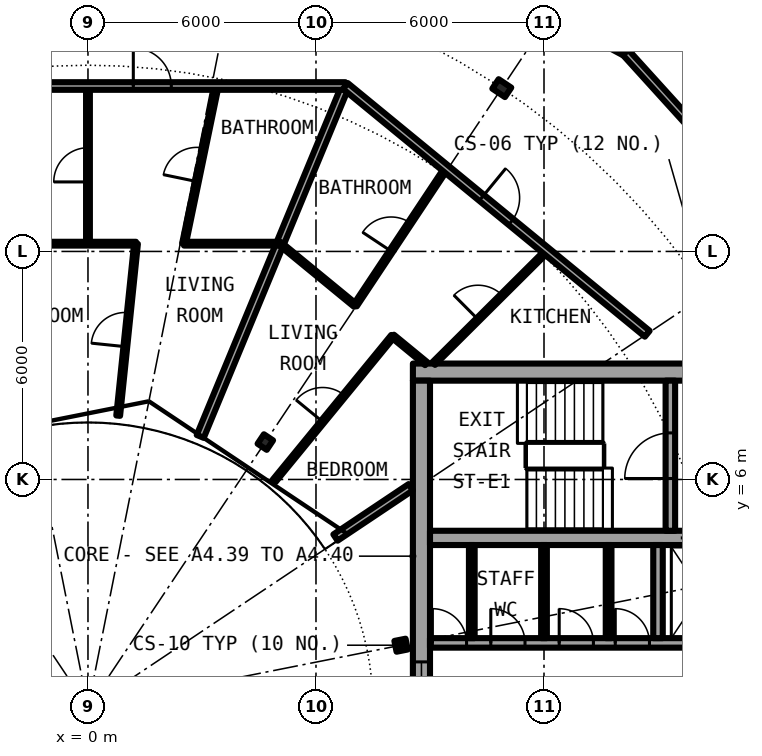
"""IFC4 building model, lengths in metres.
Left out: names, types, materials, properties, quantities, classifications, styles, units other than length and angle.
Written with IfcOpenShell. Run it as: python <this file> out.ifc"""

import sys

from ifc_helpers import new_model, si_unit, direction, frame, frame_2d, origin, origin_2d, place, context, subcontext, project, spatial, rectangle, i_section, extrude, element, fill, save


model = new_model("IFC4")
c1 = context("Model", 3, precision=1e-05, world=origin(), true_north=direction((0.0, 1.0)))
c2 = subcontext(c1, "Body", "Model", "MODEL_VIEW")
j1 = project(units=[si_unit("LENGTHUNIT", "METRE"), si_unit("PLANEANGLEUNIT", "RADIAN")], contexts=[c1])
p1 = place(None, origin())
s1 = spatial("IfcSite", under=j1, at=p1, CompositionType="ELEMENT")
p2 = place(p1, origin())
s2 = spatial("IfcBuilding", under=s1, at=p2, CompositionType="ELEMENT")
p3 = place(p2, frame((0.0, 0.0, 212.7)))
s3 = spatial("IfcBuildingStorey", under=s2, at=p3, CompositionType="ELEMENT", Elevation=212.7)
p4 = place(p3, frame((10.889, 16.297, 0.0), z_axis=(0.0, 0.0, 1.0), x_axis=(0.55557023302, 0.831469612303, 0.0)))
e1 = element("IfcColumn", 1, at=p4, inside=s3, PredefinedType="COLUMN", context=c2, shape_type="SweptSolid", body=[
    extrude(i_section(OverallWidth=0.3, OverallDepth=0.4, WebThickness=0.013, FlangeThickness=0.024, FilletRadius=0.027, at=origin_2d()), origin(), (0.0, 0.0, 1.0), 3.05),
])
for number, where, z_axis, x_axis in (
    (2, (8.239, 1.639, 0.0), (0.0, 0.0, 1.0), (0.981, 0.195, 0.0)),
    (3, (4.667, 6.984, 0.0), (0.0, 0.0, 1.0), (0.556, 0.831, 0.0)),
):
    element("IfcColumn", number, at=place(p3, frame(where, z_axis=z_axis, x_axis=x_axis)), inside=s3, PredefinedType="COLUMN", context=c2, shape_type="SweptSolid", body=[
        extrude(i_section(OverallWidth=0.3, OverallDepth=0.29, WebThickness=0.009, FlangeThickness=0.014, FilletRadius=0.027, at=origin_2d()), origin(), (0.0, 0.0, 1.0), 3.05),
    ])
p5 = place(p3, frame((22.05, 8.825, 0.0), z_axis=(0.0, 0.0, 1.0), x_axis=(-1.0, 0.0, 0.0)))
e4 = element("IfcWall", 4, at=p5, inside=s3, PredefinedType="SHEAR", context=c2, shape_type="SweptSolid", body=[
    extrude(rectangle(XDim=13.5, YDim=0.45, at=frame_2d((6.75, 0.0))), origin(), (0.0, 0.0, 1.0), 3.05),
])
p6 = place(p5, frame((0.975, 0.0, 0.0)))
e5 = element("IfcOpeningElement", 5, at=p6, cuts=e4, PredefinedType="OPENING", context=c2, shape_type="SweptSolid", body=[
    extrude(rectangle(XDim=1.2, YDim=2.3, at=frame_2d((0.6, 1.15))), frame((0.0, 0.235, 0.0), z_axis=(0.0, -1.0, 0.0), x_axis=(1.0, 0.0, 0.0)), (0.0, 0.0, 1.0), 0.47),
])
p7 = place(p3, frame((8.775, -8.6, 0.0), z_axis=(0.0, 0.0, 1.0), x_axis=(0.0, 1.0, 0.0)))
e6 = element("IfcWall", 6, at=p7, inside=s3, PredefinedType="SHEAR", context=c2, shape_type="SweptSolid", body=[
    extrude(rectangle(XDim=17.2, YDim=0.45, at=frame_2d((8.6, 0.0))), origin(), (0.0, 0.0, 1.0), 3.05),
])
p8 = place(p7, frame((7.4, 0.0, 0.1)))
e7 = element("IfcOpeningElement", 7, at=p8, cuts=e6, PredefinedType="OPENING", context=c2, shape_type="SweptSolid", body=[
    extrude(rectangle(XDim=2.4, YDim=2.2, at=frame_2d((1.2, 1.1))), frame((0.0, 0.235, 0.0), z_axis=(0.0, -1.0, 0.0), x_axis=(1.0, 0.0, 0.0)), (0.0, 0.0, 1.0), 0.47),
])
p9 = place(p3, frame((9.0, 1.7, 0.0), z_axis=(0.0, 0.0, 1.0), x_axis=(1.0, 0.0, 0.0)))
e8 = element("IfcWall", 8, at=p9, inside=s3, PredefinedType="SHEAR", context=c2, shape_type="SweptSolid", body=[
    extrude(rectangle(XDim=10.15, YDim=0.25, at=frame_2d((5.075, 0.0))), origin(), (0.0, 0.0, 1.0), 3.05),
])
p10 = place(p9, frame((0.062, 0.0, 0.0)))
e9 = element("IfcOpeningElement", 9, at=p10, cuts=e8, PredefinedType="OPENING", context=c2, shape_type="SweptSolid", body=[
    extrude(rectangle(XDim=0.9, YDim=2.3, at=frame_2d((0.45, 1.15))), frame((0.0, 0.135, 0.0), z_axis=(0.0, -1.0, 0.0), x_axis=(1.0, 0.0, 0.0)), (0.0, 0.0, 1.0), 0.27),
])
p11 = place(p9, frame((1.6, 0.0, 0.0)))
e10 = element("IfcOpeningElement", 10, at=p11, cuts=e8, PredefinedType="OPENING", context=c2, shape_type="SweptSolid", body=[
    extrude(rectangle(XDim=0.9, YDim=2.3, at=frame_2d((0.45, 1.15))), frame((0.0, 0.135, 0.0), z_axis=(0.0, -1.0, 0.0), x_axis=(1.0, 0.0, 0.0)), (0.0, 0.0, 1.0), 0.27),
])
p12 = place(p9, frame((3.4, 0.0, 0.0)))
e11 = element("IfcOpeningElement", 11, at=p12, cuts=e8, PredefinedType="OPENING", context=c2, shape_type="SweptSolid", body=[
    extrude(rectangle(XDim=0.9, YDim=2.3, at=frame_2d((0.45, 1.15))), frame((0.0, 0.135, 0.0), z_axis=(0.0, -1.0, 0.0), x_axis=(1.0, 0.0, 0.0)), (0.0, 0.0, 1.0), 0.27),
])
p13 = place(p9, frame((4.875, 0.0, 0.0)))
e12 = element("IfcOpeningElement", 12, at=p13, cuts=e8, PredefinedType="OPENING", context=c2, shape_type="SweptSolid", body=[
    extrude(rectangle(XDim=0.9, YDim=2.3, at=frame_2d((0.45, 1.15))), frame((0.0, 0.135, 0.0), z_axis=(0.0, -1.0, 0.0), x_axis=(1.0, 0.0, 0.0)), (0.0, 0.0, 1.0), 0.27),
])
p14 = place(p9, frame((8.837, 0.0, 0.0)))
e13 = element("IfcOpeningElement", 13, at=p14, cuts=e8, PredefinedType="OPENING", context=c2, shape_type="SweptSolid", body=[
    extrude(rectangle(XDim=0.9, YDim=2.3, at=frame_2d((0.45, 1.15))), frame((0.0, 0.135, 0.0), z_axis=(0.0, -1.0, 0.0), x_axis=(1.0, 0.0, 0.0)), (0.0, 0.0, 1.0), 0.27),
])
p15 = place(p3, frame((9.0, 4.462, 0.0), z_axis=(0.0, 0.0, 1.0), x_axis=(1.0, 0.0, 0.0)))
e14 = element("IfcWall", 14, at=p15, inside=s3, PredefinedType="SHEAR", context=c2, shape_type="SweptSolid", body=[
    extrude(rectangle(XDim=10.15, YDim=0.375, at=frame_2d((5.075, 0.0))), origin(), (0.0, 0.0, 1.0), 3.05),
])
p16 = place(p15, frame((6.6, 0.0, 0.0)))
e15 = element("IfcOpeningElement", 15, at=p16, cuts=e14, PredefinedType="OPENING", context=c2, shape_type="SweptSolid", body=[
    extrude(rectangle(XDim=1.1, YDim=2.3, at=frame_2d((0.55, 1.15))), frame((0.0, 0.198, 0.0), z_axis=(0.0, -1.0, 0.0), x_axis=(1.0, 0.0, 0.0)), (0.0, 0.0, 1.0), 0.395),
])
p17 = place(p3, frame((15.325, 4.65, 0.0), z_axis=(0.0, 0.0, 1.0), x_axis=(0.0, 1.0, 0.0)))
e16 = element("IfcWall", 16, at=p17, inside=s3, PredefinedType="SHEAR", context=c2, shape_type="SweptSolid", body=[
    extrude(rectangle(XDim=3.95, YDim=0.25, at=frame_2d((1.975, 0.0))), origin(), (0.0, 0.0, 1.0), 3.05),
])
p18 = place(p17, frame((1.375, 0.0, 0.0)))
e17 = element("IfcOpeningElement", 17, at=p18, cuts=e16, PredefinedType="OPENING", context=c2, shape_type="SweptSolid", body=[
    extrude(rectangle(XDim=1.2, YDim=2.3, at=frame_2d((0.6, 1.15))), frame((0.0, 0.135, 0.0), z_axis=(0.0, -1.0, 0.0), x_axis=(1.0, 0.0, 0.0)), (0.0, 0.0, 1.0), 0.27),
])
p19 = place(p3, frame((15.0, 1.825, 0.0), z_axis=(0.0, 0.0, 1.0), x_axis=(0.0, 1.0, 0.0)))
e18 = element("IfcWall", 18, at=p19, inside=s3, PredefinedType="SOLIDWALL", context=c2, shape_type="SweptSolid", body=[
    extrude(rectangle(XDim=2.45, YDim=0.25, at=frame_2d((1.225, 0.0))), origin(), (0.0, 0.0, 1.0), 2.7),
])
for number, where, z_axis, x_axis in (
    (19, (10.1, 1.825, 0.0), (0.0, 0.0, 1.0), (0.0, 1.0, 0.0)),
    (20, (12.0, 1.825, 0.0), (0.0, 0.0, 1.0), (0.0, 1.0, 0.0)),
    (21, (13.7, 1.825, 0.0), (0.0, 0.0, 1.0), (0.0, 1.0, 0.0)),
):
    element("IfcWall", number, at=place(p3, frame(where, z_axis=z_axis, x_axis=x_axis)), inside=s3, PredefinedType="PARTITIONING", context=c2, shape_type="SweptSolid", body=[
        extrude(rectangle(XDim=2.45, YDim=0.15, at=frame_2d((1.225, 0.0))), origin(), (0.0, 0.0, 1.0), 2.7),
    ])
p20 = place(p3, frame((4.901, 5.966, 0.0), z_axis=(0.0, 0.0, 1.0), x_axis=(0.633851064378, 0.773455123577, 0.0)))
e22 = element("IfcWall", 22, at=p20, inside=s3, PredefinedType="PARTITIONING", context=c2, shape_type="SweptSolid", body=[
    extrude(rectangle(XDim=4.919, YDim=0.1, at=frame_2d((2.46, 0.0))), origin(), (0.0, 0.0, 1.0), 2.7),
])
p21 = place(p20, frame((2.009, 0.0, 0.0)))
e23 = element("IfcOpeningElement", 23, at=p21, cuts=e22, PredefinedType="OPENING", context=c2, shape_type="SweptSolid", body=[
    extrude(rectangle(XDim=0.9, YDim=2.3, at=frame_2d((0.45, 1.15))), frame((0.0, 0.06, 0.0), z_axis=(0.0, -1.0, 0.0), x_axis=(1.0, 0.0, 0.0)), (0.0, 0.0, 1.0), 0.12),
])
p22 = place(p3, frame((0.0, 12.204, 0.0), z_axis=(0.0, 0.0, 1.0), x_axis=(0.0, 1.0, 0.0)))
e24 = element("IfcWall", 24, at=p22, inside=s3, PredefinedType="PARTITIONING", context=c2, shape_type="SweptSolid", body=[
    extrude(rectangle(XDim=4.149, YDim=0.1, at=frame_2d((2.074, 0.0))), origin(), (0.0, 0.0, 1.0), 2.7),
])
p23 = place(p22, frame((1.625, 0.0, 0.0)))
e25 = element("IfcOpeningElement", 25, at=p23, cuts=e24, PredefinedType="OPENING", context=c2, shape_type="SweptSolid", body=[
    extrude(rectangle(XDim=0.9, YDim=2.3, at=frame_2d((0.45, 1.15))), frame((0.0, 0.06, 0.0), z_axis=(0.0, -1.0, 0.0), x_axis=(1.0, 0.0, 0.0)), (0.0, 0.0, 1.0), 0.12),
])
p24 = place(p3, frame((0.795, 7.679, 0.0), z_axis=(0.0, 0.0, 1.0), x_axis=(0.103089563582, 0.994672077561, 0.0)))
e26 = element("IfcWall", 26, at=p24, inside=s3, PredefinedType="PARTITIONING", context=c2, shape_type="SweptSolid", body=[
    extrude(rectangle(XDim=4.549, YDim=0.1, at=frame_2d((2.275, 0.0))), origin(), (0.0, 0.0, 1.0), 2.7),
])
p25 = place(p24, frame((1.825, 0.0, 0.0)))
e27 = element("IfcOpeningElement", 27, at=p25, cuts=e26, PredefinedType="OPENING", context=c2, shape_type="SweptSolid", body=[
    extrude(rectangle(XDim=0.9, YDim=2.3, at=frame_2d((0.45, 1.15))), frame((0.0, 0.06, 0.0), z_axis=(0.0, -1.0, 0.0), x_axis=(1.0, 0.0, 0.0)), (0.0, 0.0, 1.0), 0.12),
])
p26 = place(p3, frame((2.527, 12.204, 0.0), z_axis=(0.0, 0.0, 1.0), x_axis=(0.202937120105, 0.979191771454, 0.0)))
e28 = element("IfcWall", 28, at=p26, inside=s3, PredefinedType="PARTITIONING", context=c2, shape_type="SweptSolid", body=[
    extrude(rectangle(XDim=4.237, YDim=0.1, at=frame_2d((2.119, 0.0))), origin(), (0.0, 0.0, 1.0), 2.7),
])
p27 = place(p26, frame((1.669, 0.0, 0.0)))
e29 = element("IfcOpeningElement", 29, at=p27, cuts=e28, PredefinedType="OPENING", context=c2, shape_type="SweptSolid", body=[
    extrude(rectangle(XDim=0.9, YDim=2.3, at=frame_2d((0.45, 1.15))), frame((0.0, 0.06, 0.0), z_axis=(0.0, -1.0, 0.0), x_axis=(1.0, 0.0, 0.0)), (0.0, 0.0, 1.0), 0.12),
])
p28 = place(p3, frame((2.954, 7.132, 0.0), z_axis=(0.0, 0.0, 1.0), x_axis=(0.382632652025, 0.923900564782, 0.0)))
e30 = element("IfcWall", 30, at=p28, inside=s3, PredefinedType="PARTITIONING", context=c2, shape_type="SweptSolid", body=[
    extrude(rectangle(XDim=9.98, YDim=0.2, at=frame_2d((4.99, 0.0))), origin(), (0.0, 0.0, 1.0), 2.7),
])
p29 = place(p3, frame((7.031, 10.582, 0.0), z_axis=(0.0, 0.0, 1.0), x_axis=(0.553303732327, 0.832979579457, 0.0)))
e31 = element("IfcWall", 31, at=p29, inside=s3, PredefinedType="PARTITIONING", context=c2, shape_type="SweptSolid", body=[
    extrude(rectangle(XDim=4.319, YDim=0.1, at=frame_2d((2.16, 0.0))), origin(), (0.0, 0.0, 1.0), 2.7),
])
p30 = place(p29, frame((1.71, 0.0, 0.0)))
e32 = element("IfcOpeningElement", 32, at=p30, cuts=e31, PredefinedType="OPENING", context=c2, shape_type="SweptSolid", body=[
    extrude(rectangle(XDim=0.9, YDim=2.3, at=frame_2d((0.45, 1.15))), frame((0.0, 0.06, 0.0), z_axis=(0.0, -1.0, 0.0), x_axis=(1.0, 0.0, 0.0)), (0.0, 0.0, 1.0), 0.12),
])
p31 = place(p3, frame((9.097, 9.05, 0.0), z_axis=(0.0, 0.0, 1.0), x_axis=(0.708909651863, 0.705299302067, 0.0)))
e33 = element("IfcWall", 33, at=p31, inside=s3, PredefinedType="PARTITIONING", context=c2, shape_type="SweptSolid", body=[
    extrude(rectangle(XDim=4.193, YDim=0.1, at=frame_2d((2.096, 0.0))), origin(), (0.0, 0.0, 1.0), 2.7),
])
p32 = place(p31, frame((1.646, 0.0, 0.0)))
e34 = element("IfcOpeningElement", 34, at=p32, cuts=e33, PredefinedType="OPENING", context=c2, shape_type="SweptSolid", body=[
    extrude(rectangle(XDim=0.9, YDim=2.3, at=frame_2d((0.45, 1.15))), frame((0.0, 0.06, 0.0), z_axis=(0.0, -1.0, 0.0), x_axis=(1.0, 0.0, 0.0)), (0.0, 0.0, 1.0), 0.12),
])
p33 = place(p3, frame((14.147, 17.238, 0.0), z_axis=(0.0, 0.0, 1.0), x_axis=(0.634374159378, 0.773026148273, 0.0)))
e35 = element("IfcWall", 35, at=p33, inside=s3, PredefinedType="PARTITIONING", context=c2, shape_type="SweptSolid", body=[
    extrude(rectangle(XDim=4.876, YDim=0.2, at=frame_2d((2.438, 0.0))), origin(), (0.0, 0.0, 1.0), 2.7),
])
p34 = place(p3, frame((15.612, 15.622, 0.0), z_axis=(0.0, 0.0, 1.0), x_axis=(0.70679853939, 0.707414888673, 0.0)))
e36 = element("IfcWall", 36, at=p34, inside=s3, PredefinedType="PARTITIONING", context=c2, shape_type="SweptSolid", body=[
    extrude(rectangle(XDim=1.584, YDim=0.1, at=frame_2d((0.792, 0.0))), origin(), (0.0, 0.0, 1.0), 2.7),
])
p35 = place(p3, frame((6.513, 4.472, 0.0), z_axis=(0.0, 0.0, 1.0), x_axis=(0.831403409976, 0.555669299026, 0.0)))
e37 = element("IfcWall", 37, at=p35, inside=s3, PredefinedType="PARTITIONING", context=c2, shape_type="SweptSolid", body=[
    extrude(rectangle(XDim=2.383, YDim=0.2, at=frame_2d((1.191, 0.0))), origin(), (0.0, 0.0, 1.0), 2.7),
])
p36 = place(p3, frame((-5.055, 12.204, 0.0), z_axis=(0.0, 0.0, 1.0), x_axis=(1.0, 0.0, 0.0)))
e38 = element("IfcWall", 38, at=p36, inside=s3, PredefinedType="PARTITIONING", context=c2, shape_type="SweptSolid", body=[
    extrude(rectangle(XDim=6.319, YDim=0.1, at=frame_2d((3.159, 0.0))), origin(), (0.0, 0.0, 1.0), 2.7),
])
p37 = place(p3, frame((2.527, 12.204, 0.0), z_axis=(0.0, 0.0, 1.0), x_axis=(1.0, 0.0, 0.0)))
e39 = element("IfcWall", 39, at=p37, inside=s3, PredefinedType="PARTITIONING", context=c2, shape_type="SweptSolid", body=[
    extrude(rectangle(XDim=2.528, YDim=0.1, at=frame_2d((1.264, 0.0))), origin(), (0.0, 0.0, 1.0), 2.7),
])
p38 = place(p3, frame((5.057, 12.203, 0.0), z_axis=(0.0, 0.0, 1.0), x_axis=(0.772990508216, -0.634417586617, 0.0)))
e40 = element("IfcWall", 40, at=p38, inside=s3, PredefinedType="PARTITIONING", context=c2, shape_type="SweptSolid", body=[
    extrude(rectangle(XDim=2.556, YDim=0.1, at=frame_2d((1.278, 0.0))), origin(), (0.0, 0.0, 1.0), 2.7),
])
p39 = place(p3, frame((8.019, 9.771, 0.0), z_axis=(0.0, 0.0, 1.0), x_axis=(0.772842270779, -0.63459815986, 0.0)))
e41 = element("IfcWall", 41, at=p39, inside=s3, PredefinedType="PARTITIONING", context=c2, shape_type="SweptSolid", body=[
    extrude(rectangle(XDim=1.143, YDim=0.1, at=frame_2d((0.571, 0.0))), origin(), (0.0, 0.0, 1.0), 2.7),
])
p40 = place(p3, frame((-6.773, 16.353, 0.0), z_axis=(0.0, 0.0, 1.0), x_axis=(1.0, 0.0, 0.0)))
e42 = element("IfcWall", 42, at=p40, inside=s3, PredefinedType="PARTITIONING", context=c2, shape_type="SweptSolid", body=[
    extrude(rectangle(XDim=13.546, YDim=0.2, at=frame_2d((6.773, 0.0))), origin(), (0.0, 0.0, 1.0), 2.7),
])
p41 = place(p40, frame((7.966, 0.0, 0.0)))
e43 = element("IfcOpeningElement", 43, at=p41, cuts=e42, PredefinedType="OPENING", context=c2, shape_type="SweptSolid", body=[
    extrude(rectangle(XDim=1.0, YDim=2.3, at=frame_2d((0.5, 1.15))), frame((0.0, 0.11, 0.0), z_axis=(0.0, -1.0, 0.0), x_axis=(1.0, 0.0, 0.0)), (0.0, 0.0, 1.0), 0.22),
])
p42 = place(p3, frame((6.773, 16.353, 0.0), z_axis=(0.0, 0.0, 1.0), x_axis=(0.773034536097, -0.634363938131, 0.0)))
e44 = element("IfcWall", 44, at=p42, inside=s3, PredefinedType="PARTITIONING", context=c2, shape_type="SweptSolid", body=[
    extrude(rectangle(XDim=10.277, YDim=0.2, at=frame_2d((5.138, 0.0))), origin(), (0.0, 0.0, 1.0), 2.7),
])
p43 = place(p42, frame((4.638, 0.0, 0.0)))
e45 = element("IfcOpeningElement", 45, at=p43, cuts=e44, PredefinedType="OPENING", context=c2, shape_type="SweptSolid", body=[
    extrude(rectangle(XDim=1.0, YDim=2.3, at=frame_2d((0.5, 1.15))), frame((0.0, 0.11, 0.0), z_axis=(0.0, -1.0, 0.0), x_axis=(1.0, 0.0, 0.0)), (0.0, 0.0, 1.0), 0.22),
])
p44 = place(p3, frame((6.473, 21.34, 0.0), z_axis=(0.0, 0.0, 1.0), x_axis=(0.881912965532, -0.471412262491, 0.0)))
e46 = element("IfcWall", 46, at=p44, inside=s3, PredefinedType="PARTITIONING", context=c2, shape_type="SweptSolid", body=[
    extrude(rectangle(XDim=8.702, YDim=0.2, at=frame_2d((4.351, 0.0))), origin(), (0.0, 0.0, 1.0), 2.7),
])
p45 = place(p44, frame((2.764, 0.0, 0.0)))
e47 = element("IfcOpeningElement", 47, at=p45, cuts=e46, PredefinedType="OPENING", context=c2, shape_type="SweptSolid", body=[
    extrude(rectangle(XDim=1.0, YDim=2.3, at=frame_2d((0.5, 1.15))), frame((0.0, 0.11, 0.0), z_axis=(0.0, -1.0, 0.0), x_axis=(1.0, 0.0, 0.0)), (0.0, 0.0, 1.0), 0.22),
])
p46 = place(p3, frame((14.147, 17.238, 0.0), z_axis=(0.0, 0.0, 1.0), x_axis=(0.671561669125, -0.740948665268, 0.0)))
e48 = element("IfcWall", 48, at=p46, inside=s3, PredefinedType="PARTITIONING", context=c2, shape_type="SweptSolid", body=[
    extrude(rectangle(XDim=6.544, YDim=0.2, at=frame_2d((3.272, 0.0))), origin(), (0.0, 0.0, 1.0), 2.7),
])
p47 = place(p46, frame((3.862, 0.0, 0.0)))
e49 = element("IfcOpeningElement", 49, at=p47, cuts=e48, PredefinedType="OPENING", context=c2, shape_type="SweptSolid", body=[
    extrude(rectangle(XDim=1.0, YDim=2.3, at=frame_2d((0.5, 1.15))), frame((0.0, 0.11, 0.0), z_axis=(0.0, -1.0, 0.0), x_axis=(1.0, 0.0, 0.0)), (0.0, 0.0, 1.0), 0.22),
])
p48 = place(p3, frame((15.162, 18.475, 0.0), z_axis=(0.0, 0.0, 1.0), x_axis=(0.671528384412, -0.740978831634, 0.0)))
e50 = element("IfcWall", 50, at=p48, inside=s3, PredefinedType="PARTITIONING", context=c2, shape_type="SweptSolid", body=[
    extrude(rectangle(XDim=2.338, YDim=0.1, at=frame_2d((1.169, 0.0))), origin(), (0.0, 0.0, 1.0), 2.7),
])
p49 = place(p48, frame((0.719, 0.0, 0.0)))
e51 = element("IfcOpeningElement", 51, at=p49, cuts=e50, PredefinedType="OPENING", context=c2, shape_type="SweptSolid", body=[
    extrude(rectangle(XDim=0.9, YDim=2.3, at=frame_2d((0.45, 1.15))), frame((0.0, 0.06, 0.0), z_axis=(0.0, -1.0, 0.0), x_axis=(1.0, 0.0, 0.0)), (0.0, 0.0, 1.0), 0.12),
])
p50 = place(p16, origin())
e52 = element("IfcDoor", 52, at=p50, inside=s3, OperationType="DOUBLE_DOOR_SLIDING", PredefinedType="DOOR", context=c2, shape_type="SweptSolid", body=[
    extrude(rectangle(XDim=1.1, YDim=2.3, at=frame_2d((0.55, 1.15))), frame((0.0, 0.025, 0.0), z_axis=(0.0, -1.0, 0.0), x_axis=(1.0, 0.0, 0.0)), (0.0, 0.0, 1.0), 0.05),
])
fill(e15, e52)
p51 = place(p10, origin())
e53 = element("IfcDoor", 53, at=p51, inside=s3, OperationType="SINGLE_SWING_RIGHT", PredefinedType="DOOR", context=c2, shape_type="SweptSolid", body=[
    extrude(rectangle(XDim=0.9, YDim=2.3, at=frame_2d((0.45, 1.15))), frame((0.0, 0.025, 0.0), z_axis=(0.0, -1.0, 0.0), x_axis=(1.0, 0.0, 0.0)), (0.0, 0.0, 1.0), 0.05),
])
fill(e9, e53)
p52 = place(p11, origin())
e54 = element("IfcDoor", 54, at=p52, inside=s3, OperationType="SINGLE_SWING_RIGHT", PredefinedType="DOOR", context=c2, shape_type="SweptSolid", body=[
    extrude(rectangle(XDim=0.9, YDim=2.3, at=frame_2d((0.45, 1.15))), frame((0.0, 0.025, 0.0), z_axis=(0.0, -1.0, 0.0), x_axis=(1.0, 0.0, 0.0)), (0.0, 0.0, 1.0), 0.05),
])
fill(e10, e54)
p53 = place(p12, origin())
e55 = element("IfcDoor", 55, at=p53, inside=s3, OperationType="SINGLE_SWING_RIGHT", PredefinedType="DOOR", context=c2, shape_type="SweptSolid", body=[
    extrude(rectangle(XDim=0.9, YDim=2.3, at=frame_2d((0.45, 1.15))), frame((0.0, 0.025, 0.0), z_axis=(0.0, -1.0, 0.0), x_axis=(1.0, 0.0, 0.0)), (0.0, 0.0, 1.0), 0.05),
])
fill(e11, e55)
p54 = place(p13, origin())
e56 = element("IfcDoor", 56, at=p54, inside=s3, OperationType="SINGLE_SWING_LEFT", PredefinedType="DOOR", context=c2, shape_type="SweptSolid", body=[
    extrude(rectangle(XDim=0.9, YDim=2.3, at=frame_2d((0.45, 1.15))), frame((0.0, 0.025, 0.0), z_axis=(0.0, -1.0, 0.0), x_axis=(1.0, 0.0, 0.0)), (0.0, 0.0, 1.0), 0.05),
])
fill(e12, e56)
p55 = place(p18, origin())
e57 = element("IfcDoor", 57, at=p55, inside=s3, OperationType="SINGLE_SWING_LEFT", PredefinedType="DOOR", context=c2, shape_type="SweptSolid", body=[
    extrude(rectangle(XDim=1.2, YDim=2.3, at=frame_2d((0.6, 1.15))), frame((0.0, 0.025, 0.0), z_axis=(0.0, -1.0, 0.0), x_axis=(1.0, 0.0, 0.0)), (0.0, 0.0, 1.0), 0.05),
])
fill(e17, e57)
p56 = place(p8, origin())
e58 = element("IfcWindow", 58, at=p56, inside=s3, PartitioningType="SINGLE_PANEL", PredefinedType="WINDOW", context=c2, shape_type="SweptSolid", body=[
    extrude(rectangle(XDim=2.4, YDim=2.2, at=frame_2d((1.2, 1.1))), frame((0.0, 0.03, 0.0), z_axis=(0.0, -1.0, 0.0), x_axis=(1.0, 0.0, 0.0)), (0.0, 0.0, 1.0), 0.06),
])
fill(e7, e58)
p57 = place(p43, origin())
e59 = element("IfcDoor", 59, at=p57, inside=s3, OperationType="SINGLE_SWING_RIGHT", PredefinedType="DOOR", context=c2, shape_type="SweptSolid", body=[
    extrude(rectangle(XDim=1.0, YDim=2.3, at=frame_2d((0.5, 1.15))), frame((0.0, 0.025, 0.0), z_axis=(0.0, -1.0, 0.0), x_axis=(1.0, 0.0, 0.0)), (0.0, 0.0, 1.0), 0.05),
])
fill(e45, e59)
p58 = place(p30, origin())
e60 = element("IfcDoor", 60, at=p58, inside=s3, OperationType="SINGLE_SWING_LEFT", PredefinedType="DOOR", context=c2, shape_type="SweptSolid", body=[
    extrude(rectangle(XDim=0.9, YDim=2.3, at=frame_2d((0.45, 1.15))), frame((0.0, 0.025, 0.0), z_axis=(0.0, -1.0, 0.0), x_axis=(1.0, 0.0, 0.0)), (0.0, 0.0, 1.0), 0.05),
])
fill(e32, e60)
p59 = place(p32, origin())
e61 = element("IfcDoor", 61, at=p59, inside=s3, OperationType="SINGLE_SWING_RIGHT", PredefinedType="DOOR", context=c2, shape_type="SweptSolid", body=[
    extrude(rectangle(XDim=0.9, YDim=2.3, at=frame_2d((0.45, 1.15))), frame((0.0, 0.025, 0.0), z_axis=(0.0, -1.0, 0.0), x_axis=(1.0, 0.0, 0.0)), (0.0, 0.0, 1.0), 0.05),
])
fill(e34, e61)
p60 = place(p21, origin())
e62 = element("IfcDoor", 62, at=p60, inside=s3, OperationType="SINGLE_SWING_LEFT", PredefinedType="DOOR", context=c2, shape_type="SweptSolid", body=[
    extrude(rectangle(XDim=0.9, YDim=2.3, at=frame_2d((0.45, 1.15))), frame((0.0, 0.025, 0.0), z_axis=(0.0, -1.0, 0.0), x_axis=(1.0, 0.0, 0.0)), (0.0, 0.0, 1.0), 0.05),
])
fill(e23, e62)
p61 = place(p41, origin())
e63 = element("IfcDoor", 63, at=p61, inside=s3, OperationType="SINGLE_SWING_RIGHT", PredefinedType="DOOR", context=c2, shape_type="SweptSolid", body=[
    extrude(rectangle(XDim=1.0, YDim=2.3, at=frame_2d((0.5, 1.15))), frame((0.0, 0.025, 0.0), z_axis=(0.0, -1.0, 0.0), x_axis=(1.0, 0.0, 0.0)), (0.0, 0.0, 1.0), 0.05),
])
fill(e43, e63)
p62 = place(p27, origin())
e64 = element("IfcDoor", 64, at=p62, inside=s3, OperationType="SINGLE_SWING_RIGHT", PredefinedType="DOOR", context=c2, shape_type="SweptSolid", body=[
    extrude(rectangle(XDim=0.9, YDim=2.3, at=frame_2d((0.45, 1.15))), frame((0.0, 0.025, 0.0), z_axis=(0.0, -1.0, 0.0), x_axis=(1.0, 0.0, 0.0)), (0.0, 0.0, 1.0), 0.05),
])
fill(e29, e64)
p63 = place(p23, origin())
e65 = element("IfcDoor", 65, at=p63, inside=s3, OperationType="SINGLE_SWING_RIGHT", PredefinedType="DOOR", context=c2, shape_type="SweptSolid", body=[
    extrude(rectangle(XDim=0.9, YDim=2.3, at=frame_2d((0.45, 1.15))), frame((0.0, 0.025, 0.0), z_axis=(0.0, -1.0, 0.0), x_axis=(1.0, 0.0, 0.0)), (0.0, 0.0, 1.0), 0.05),
])
fill(e25, e65)
p64 = place(p25, origin())
e66 = element("IfcDoor", 66, at=p64, inside=s3, OperationType="SINGLE_SWING_RIGHT", PredefinedType="DOOR", context=c2, shape_type="SweptSolid", body=[
    extrude(rectangle(XDim=0.9, YDim=2.3, at=frame_2d((0.45, 1.15))), frame((0.0, 0.025, 0.0), z_axis=(0.0, -1.0, 0.0), x_axis=(1.0, 0.0, 0.0)), (0.0, 0.0, 1.0), 0.05),
])
fill(e27, e66)
save(model, sys.argv[1])
